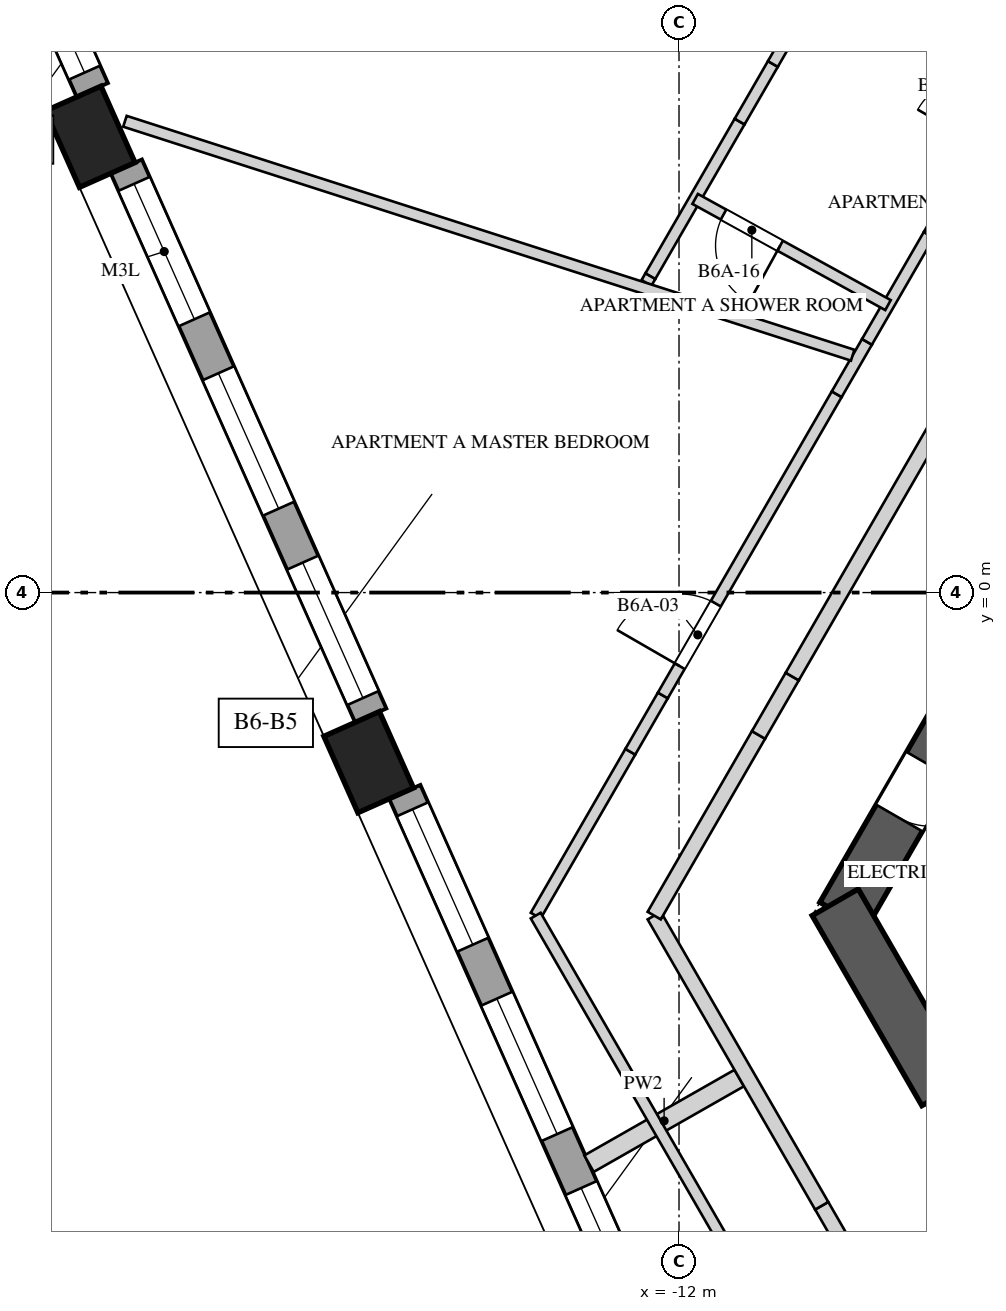
"""IFC4 building model, lengths in metres.
Left out: names, types, materials, properties, quantities, classifications, styles, units other than length and angle.
Written with IfcOpenShell. Run it as: python <this file> out.ifc"""

import sys

from ifc_helpers import new_model, si_unit, direction, frame, frame_2d, origin, origin_2d, place, context, subcontext, project, spatial, rectangle, extrude, element, fill, save


model = new_model("IFC4")
c1 = context("Model", 3, precision=1e-05, world=origin(), true_north=direction((0.0, 1.0)))
c2 = subcontext(c1, "Body", "Model", "MODEL_VIEW")
j1 = project(units=[si_unit("LENGTHUNIT", "METRE"), si_unit("PLANEANGLEUNIT", "RADIAN")], contexts=[c1])
p1 = place(None, origin())
s1 = spatial("IfcSite", under=j1, at=p1, CompositionType="ELEMENT")
p2 = place(p1, origin())
s2 = spatial("IfcBuilding", under=s1, at=p2, CompositionType="ELEMENT")
p3 = place(p2, frame((0.0, 0.0, 245.2)))
s3 = spatial("IfcBuildingStorey", under=s2, at=p3, CompositionType="ELEMENT", Elevation=245.2)
p4 = place(p3, frame((-1.241, 10.65, 0.0), z_axis=(0.0, 0.0, 1.0), x_axis=(-0.500003331888, -0.866023480109, 0.0)))
e1 = element("IfcWall", 1, at=p4, inside=s3, PredefinedType="SHEAR", context=c2, shape_type="SweptSolid", body=[
    extrude(rectangle(XDim=17.205, YDim=0.7, at=frame_2d((8.603, 0.0))), origin(), (0.0, 0.0, 1.0), 4.0),
])
p5 = place(p4, frame((6.808, 0.0, 0.0)))
e2 = element("IfcOpeningElement", 2, at=p5, cuts=e1, PredefinedType="OPENING", context=c2, shape_type="SweptSolid", body=[
    extrude(rectangle(XDim=1.0, YDim=2.4, at=frame_2d((0.5, 1.2))), frame((0.0, 0.36, 0.0), z_axis=(0.0, -1.0, 0.0), x_axis=(1.0, 0.0, 0.0)), (0.0, 0.0, 1.0), 0.72),
])
p6 = place(p4, frame((14.922, 0.0, 0.0)))
e3 = element("IfcOpeningElement", 3, at=p6, cuts=e1, PredefinedType="OPENING", context=c2, shape_type="SweptSolid", body=[
    extrude(rectangle(XDim=0.8, YDim=2.1, at=frame_2d((0.4, 1.05))), frame((0.0, 0.36, 0.0), z_axis=(0.0, -1.0, 0.0), x_axis=(1.0, 0.0, 0.0)), (0.0, 0.0, 1.0), 0.72),
])
p7 = place(p3, frame((-9.945, -4.075, 0.0), z_axis=(0.0, 0.0, 1.0), x_axis=(0.499995765644, -0.866027848477, 0.0)))
e4 = element("IfcWall", 4, at=p7, inside=s3, PredefinedType="SHEAR", context=c2, shape_type="SweptSolid", body=[
    extrude(rectangle(XDim=2.887, YDim=0.7, at=frame_2d((1.443, 0.0))), origin(), (0.0, 0.0, 1.0), 4.0),
])
for number, where, z_axis, x_axis in (
    (5, (-19.746, 5.997, 0.0), (0.0, 0.0, 1.0), (0.407, -0.914, 0.0)),
    (6, (-16.083, -2.231, 0.0), (0.0, 0.0, 1.0), (0.407, -0.914, 0.0)),
):
    element("IfcColumn", number, at=place(p3, frame(where, z_axis=z_axis, x_axis=x_axis)), inside=s3, PredefinedType="COLUMN", context=c2, shape_type="SweptSolid", body=[
        extrude(rectangle(XDim=1.1, YDim=0.8, at=origin_2d()), origin(), (0.0, 0.0, 1.0), 4.0),
    ])
p8 = place(p3, frame((-20.716, 8.851, 0.0), z_axis=(0.0, 0.0, 1.0), x_axis=(0.406821962592, -0.913507466172, 0.0)))
e7 = element("IfcWall", 7, at=p8, inside=s3, PredefinedType="SOLIDWALL", context=c2, shape_type="SweptSolid", body=[
    extrude(rectangle(XDim=2.452, YDim=0.45, at=frame_2d((1.226, 0.0))), origin(), (0.0, 0.0, 1.0), 3.3),
])
p9 = place(p8, frame((0.251, 0.0, 0.4)))
e8 = element("IfcOpeningElement", 8, at=p9, cuts=e7, PredefinedType="OPENING", context=c2, shape_type="SweptSolid", body=[
    extrude(rectangle(XDim=1.95, YDim=2.75, at=frame_2d((0.975, 1.375))), frame((0.0, 0.235, 0.0), z_axis=(0.0, -1.0, 0.0), x_axis=(1.0, 0.0, 0.0)), (0.0, 0.0, 1.0), 0.47),
])
p10 = place(p3, frame((-19.271, 5.606, 0.0), z_axis=(0.0, 0.0, 1.0), x_axis=(0.406760076741, -0.913535023942, 0.0)))
e9 = element("IfcWall", 9, at=p10, inside=s3, PredefinedType="SOLIDWALL", context=c2, shape_type="SweptSolid", body=[
    extrude(rectangle(XDim=7.906, YDim=0.45, at=frame_2d((3.953, 0.0))), origin(), (0.0, 0.0, 1.0), 3.3),
])
p11 = place(p10, frame((0.251, 0.0, 0.4)))
e10 = element("IfcOpeningElement", 10, at=p11, cuts=e9, PredefinedType="OPENING", context=c2, shape_type="SweptSolid", body=[
    extrude(rectangle(XDim=1.95, YDim=2.1, at=frame_2d((0.975, 1.05))), frame((0.0, 0.235, 0.0), z_axis=(0.0, -1.0, 0.0), x_axis=(1.0, 0.0, 0.0)), (0.0, 0.0, 1.0), 0.47),
])
p12 = place(p10, frame((2.978, 0.0, 0.4)))
e11 = element("IfcOpeningElement", 11, at=p12, cuts=e9, PredefinedType="OPENING", context=c2, shape_type="SweptSolid", body=[
    extrude(rectangle(XDim=1.95, YDim=2.75, at=frame_2d((0.975, 1.375))), frame((0.0, 0.235, 0.0), z_axis=(0.0, -1.0, 0.0), x_axis=(1.0, 0.0, 0.0)), (0.0, 0.0, 1.0), 0.47),
])
p13 = place(p10, frame((5.706, 0.0, 0.4)))
e12 = element("IfcOpeningElement", 12, at=p13, cuts=e9, PredefinedType="OPENING", context=c2, shape_type="SweptSolid", body=[
    extrude(rectangle(XDim=1.95, YDim=2.75, at=frame_2d((0.975, 1.375))), frame((0.0, 0.235, 0.0), z_axis=(0.0, -1.0, 0.0), x_axis=(1.0, 0.0, 0.0)), (0.0, 0.0, 1.0), 0.47),
])
p14 = place(p3, frame((-15.608, -2.622, 0.0), z_axis=(0.0, 0.0, 1.0), x_axis=(0.406748602972, -0.91354013266, 0.0)))
e13 = element("IfcWall", 13, at=p14, inside=s3, PredefinedType="SOLIDWALL", context=c2, shape_type="SweptSolid", body=[
    extrude(rectangle(XDim=7.907, YDim=0.45, at=frame_2d((3.953, 0.0))), origin(), (0.0, 0.0, 1.0), 3.3),
])
p15 = place(p14, frame((0.251, 0.0, 0.4)))
e14 = element("IfcOpeningElement", 14, at=p15, cuts=e13, PredefinedType="OPENING", context=c2, shape_type="SweptSolid", body=[
    extrude(rectangle(XDim=1.95, YDim=2.75, at=frame_2d((0.975, 1.375))), frame((0.0, 0.235, 0.0), z_axis=(0.0, -1.0, 0.0), x_axis=(1.0, 0.0, 0.0)), (0.0, 0.0, 1.0), 0.47),
])
p16 = place(p14, frame((2.978, 0.0, 0.4)))
e15 = element("IfcOpeningElement", 15, at=p16, cuts=e13, PredefinedType="OPENING", context=c2, shape_type="SweptSolid", body=[
    extrude(rectangle(XDim=1.95, YDim=2.75, at=frame_2d((0.975, 1.375))), frame((0.0, 0.235, 0.0), z_axis=(0.0, -1.0, 0.0), x_axis=(1.0, 0.0, 0.0)), (0.0, 0.0, 1.0), 0.47),
])
p17 = place(p14, frame((5.706, 0.0, 0.4)))
e16 = element("IfcOpeningElement", 16, at=p17, cuts=e13, PredefinedType="OPENING", context=c2, shape_type="SweptSolid", body=[
    extrude(rectangle(XDim=1.95, YDim=2.75, at=frame_2d((0.975, 1.375))), frame((0.0, 0.235, 0.0), z_axis=(0.0, -1.0, 0.0), x_axis=(1.0, 0.0, 0.0)), (0.0, 0.0, 1.0), 0.47),
])
p18 = place(p3, frame((-13.885, -4.25, 0.0), z_axis=(0.0, 0.0, 1.0), x_axis=(0.499999788377, 0.866025525965, 0.0)))
e17 = element("IfcWall", 17, at=p18, inside=s3, PredefinedType="PARTITIONING", context=c2, shape_type="SweptSolid", body=[
    extrude(rectangle(XDim=2.489, YDim=0.15, at=frame_2d((1.245, 0.0))), origin(), (0.0, 0.0, 1.0), 3.65),
])
p19 = place(p3, frame((-12.641, -2.094, 0.0), z_axis=(0.0, 0.0, 1.0), x_axis=(0.500068347527, 0.865985939725, 0.0)))
e18 = element("IfcWall", 18, at=p19, inside=s3, PredefinedType="PARTITIONING", context=c2, shape_type="SweptSolid", body=[
    extrude(rectangle(XDim=0.855, YDim=0.15, at=frame_2d((0.428, 0.0))), origin(), (0.0, 0.0, 1.0), 2.95),
])
p20 = place(p3, frame((-12.213, -1.354, 0.0), z_axis=(0.0, 0.0, 1.0), x_axis=(0.500001111708, 0.866024761939, 0.0)))
e19 = element("IfcWall", 19, at=p20, inside=s3, PredefinedType="PARTITIONING", context=c2, shape_type="SweptSolid", body=[
    extrude(rectangle(XDim=4.576, YDim=0.15, at=frame_2d((2.288, 0.0))), origin(), (0.0, 0.0, 1.0), 3.65),
])
p21 = place(p20, frame((0.445, 0.0, 0.0)))
e20 = element("IfcOpeningElement", 20, at=p21, cuts=e19, PredefinedType="OPENING", context=c2, shape_type="SweptSolid", body=[
    extrude(rectangle(XDim=0.95, YDim=2.4, at=frame_2d((0.475, 1.2))), frame((0.0, 0.085, 0.0), z_axis=(0.0, -1.0, 0.0), x_axis=(1.0, 0.0, 0.0)), (0.0, 0.0, 1.0), 0.17),
])
p22 = place(p3, frame((-9.925, 2.609, 0.0), z_axis=(0.0, 0.0, 1.0), x_axis=(0.499802134818, 0.866139611167, 0.0)))
e21 = element("IfcWall", 21, at=p22, inside=s3, PredefinedType="PARTITIONING", context=c2, shape_type="SweptSolid", body=[
    extrude(rectangle(XDim=0.796, YDim=0.15, at=frame_2d((0.398, 0.0))), origin(), (0.0, 0.0, 1.0), 2.75),
])
p23 = place(p3, frame((-9.527, 3.298, 0.0), z_axis=(0.0, 0.0, 1.0), x_axis=(0.500094991843, 0.865970553272, 0.0)))
e22 = element("IfcWall", 22, at=p23, inside=s3, PredefinedType="PARTITIONING", context=c2, shape_type="SweptSolid", body=[
    extrude(rectangle(XDim=1.626, YDim=0.15, at=frame_2d((0.813, 0.0))), origin(), (0.0, 0.0, 1.0), 3.65),
])
p24 = place(p3, frame((-8.714, 4.707, 0.0), z_axis=(0.0, 0.0, 1.0), x_axis=(0.499859285417, 0.866106630146, 0.0)))
e23 = element("IfcWall", 23, at=p24, inside=s3, PredefinedType="PARTITIONING", context=c2, shape_type="SweptSolid", body=[
    extrude(rectangle(XDim=0.875, YDim=0.15, at=frame_2d((0.438, 0.0))), origin(), (0.0, 0.0, 1.0), 2.55),
])
p25 = place(p3, frame((-12.428, 4.074, 0.0), z_axis=(0.0, 0.0, 1.0), x_axis=(0.500943559977, 0.865479953388, 0.0)))
e24 = element("IfcWall", 24, at=p25, inside=s3, PredefinedType="PARTITIONING", context=c2, shape_type="SweptSolid", body=[
    extrude(rectangle(XDim=0.104, YDim=0.15, at=frame_2d((0.052, 0.0))), origin(), (0.0, 0.0, 1.0), 2.75),
])
p26 = place(p3, frame((-12.376, 4.164, 0.0), z_axis=(0.0, 0.0, 1.0), x_axis=(0.499998569178, 0.866026229868, 0.0)))
e25 = element("IfcWall", 25, at=p26, inside=s3, PredefinedType="PARTITIONING", context=c2, shape_type="SweptSolid", body=[
    extrude(rectangle(XDim=2.347, YDim=0.15, at=frame_2d((1.174, 0.0))), origin(), (0.0, 0.0, 1.0), 3.65),
])
p27 = place(p3, frame((-11.203, 6.196, 0.0), z_axis=(0.0, 0.0, 1.0), x_axis=(0.499980071345, 0.866036909293, 0.0)))
e26 = element("IfcWall", 26, at=p27, inside=s3, PredefinedType="PARTITIONING", context=c2, shape_type="SweptSolid", body=[
    extrude(rectangle(XDim=0.875, YDim=0.15, at=frame_2d((0.438, 0.0))), origin(), (0.0, 0.0, 1.0), 2.55),
])
p28 = place(p3, frame((-10.765, 6.954, 0.0), z_axis=(0.0, 0.0, 1.0), x_axis=(0.499841962787, 0.866116627388, 0.0)))
e27 = element("IfcWall", 27, at=p28, inside=s3, PredefinedType="PARTITIONING", context=c2, shape_type="SweptSolid", body=[
    extrude(rectangle(XDim=0.943, YDim=0.15, at=frame_2d((0.472, 0.0))), origin(), (0.0, 0.0, 1.0), 3.65),
])
p29 = place(p3, frame((-11.208, -6.387, 0.0), z_axis=(0.0, 0.0, 1.0), x_axis=(-0.868850228445, -0.495075025153, 0.0)))
e28 = element("IfcWall", 28, at=p29, inside=s3, PredefinedType="SOLIDWALL", context=c2, shape_type="SweptSolid", body=[
    extrude(rectangle(XDim=2.274, YDim=0.25, at=frame_2d((1.137, 0.0))), origin(), (0.0, 0.0, 1.0), 3.65),
])
p30 = place(p3, frame((-11.165, -8.961, 0.0), z_axis=(0.0, 0.0, 1.0), x_axis=(-0.500009912158, 0.866019680922, 0.0)))
e29 = element("IfcWall", 29, at=p30, inside=s3, PredefinedType="PARTITIONING", context=c2, shape_type="SweptSolid", body=[
    extrude(rectangle(XDim=5.44, YDim=0.15, at=frame_2d((2.72, 0.0))), origin(), (0.0, 0.0, 1.0), 3.65),
])
p31 = place(p3, frame((-9.715, 3.123, 0.0), z_axis=(0.0, 0.0, 1.0), x_axis=(-0.952031844805, 0.305998964831, 0.0)))
e30 = element("IfcWall", 30, at=p31, inside=s3, PredefinedType="PARTITIONING", context=c2, shape_type="SweptSolid", body=[
    extrude(rectangle(XDim=10.057, YDim=0.15, at=frame_2d((5.028, 0.0))), origin(), (0.0, 0.0, 1.0), 2.75),
])
p32 = place(p3, frame((-9.25, 3.782, 0.0), z_axis=(0.0, 0.0, 1.0), x_axis=(-0.876043224435, 0.482232587991, 0.0)))
e31 = element("IfcWall", 31, at=p32, inside=s3, PredefinedType="PARTITIONING", context=c2, shape_type="SweptSolid", body=[
    extrude(rectangle(XDim=2.896, YDim=0.15, at=frame_2d((1.448, 0.0))), origin(), (0.0, 0.0, 1.0), 3.65),
])
p33 = place(p32, frame((1.62, 0.0, 0.0)))
e32 = element("IfcOpeningElement", 32, at=p33, cuts=e31, PredefinedType="OPENING", context=c2, shape_type="SweptSolid", body=[
    extrude(rectangle(XDim=0.85, YDim=2.4, at=frame_2d((0.425, 1.2))), frame((0.0, 0.085, 0.0), z_axis=(0.0, -1.0, 0.0), x_axis=(1.0, 0.0, 0.0)), (0.0, 0.0, 1.0), 0.17),
])
p34 = place(p3, frame((-9.844, -8.55, 0.0), z_axis=(0.0, 0.0, 1.0), x_axis=(-0.500000383388, 0.866025182435, 0.0)))
e33 = element("IfcWall", 33, at=p34, inside=s3, PredefinedType="SOLIDWALL", context=c2, shape_type="SweptSolid", body=[
    extrude(rectangle(XDim=0.558, YDim=0.2, at=frame_2d((0.279, 0.0))), origin(), (0.0, 0.0, 1.0), 2.95),
])
p35 = place(p3, frame((-10.123, -8.067, 0.0), z_axis=(0.0, 0.0, 1.0), x_axis=(-0.500005339912, 0.866022320763, 0.0)))
e34 = element("IfcWall", 34, at=p35, inside=s3, PredefinedType="SOLIDWALL", context=c2, shape_type="SweptSolid", body=[
    extrude(rectangle(XDim=4.408, YDim=0.2, at=frame_2d((2.204, 0.0))), origin(), (0.0, 0.0, 1.0), 3.65),
])
p36 = place(p3, frame((-12.326, -4.25, 0.0), z_axis=(0.0, 0.0, 1.0), x_axis=(0.499994514761, 0.866028570666, 0.0)))
e35 = element("IfcWall", 35, at=p36, inside=s3, PredefinedType="SOLIDWALL", context=c2, shape_type="SweptSolid", body=[
    extrude(rectangle(XDim=2.745, YDim=0.2, at=frame_2d((1.372, 0.0))), origin(), (0.0, 0.0, 1.0), 3.65),
])
p37 = place(p3, frame((-10.954, -1.873, 0.0), z_axis=(0.0, 0.0, 1.0), x_axis=(0.500016243463, 0.866016025414, 0.0)))
e36 = element("IfcWall", 36, at=p37, inside=s3, PredefinedType="SOLIDWALL", context=c2, shape_type="SweptSolid", body=[
    extrude(rectangle(XDim=0.887, YDim=0.2, at=frame_2d((0.444, 0.0))), origin(), (0.0, 0.0, 1.0), 2.95),
])
p38 = place(p3, frame((-10.51, -1.105, 0.0), z_axis=(0.0, 0.0, 1.0), x_axis=(0.499997905474, 0.866026613056, 0.0)))
e37 = element("IfcWall", 37, at=p38, inside=s3, PredefinedType="SOLIDWALL", context=c2, shape_type="SweptSolid", body=[
    extrude(rectangle(XDim=3.811, YDim=0.2, at=frame_2d((1.905, 0.0))), origin(), (0.0, 0.0, 1.0), 3.65),
])
p39 = place(p9, origin())
e38 = element("IfcWindow", 38, at=p39, inside=s3, PartitioningType="SINGLE_PANEL", PredefinedType="WINDOW", context=c2, shape_type="SweptSolid", body=[
    extrude(rectangle(XDim=1.95, YDim=2.75, at=frame_2d((0.975, 1.375))), frame((0.0, 0.03, 0.0), z_axis=(0.0, -1.0, 0.0), x_axis=(1.0, 0.0, 0.0)), (0.0, 0.0, 1.0), 0.06),
])
fill(e8, e38)
p40 = place(p11, origin())
e39 = element("IfcWindow", 39, at=p40, inside=s3, PartitioningType="SINGLE_PANEL", PredefinedType="WINDOW", context=c2, shape_type="SweptSolid", body=[
    extrude(rectangle(XDim=1.95, YDim=2.1, at=frame_2d((0.975, 1.05))), frame((0.0, 0.03, 0.0), z_axis=(0.0, -1.0, 0.0), x_axis=(1.0, 0.0, 0.0)), (0.0, 0.0, 1.0), 0.06),
])
fill(e10, e39)
p41 = place(p12, origin())
e40 = element("IfcWindow", 40, at=p41, inside=s3, PartitioningType="SINGLE_PANEL", PredefinedType="WINDOW", context=c2, shape_type="SweptSolid", body=[
    extrude(rectangle(XDim=1.95, YDim=2.75, at=frame_2d((0.975, 1.375))), frame((0.0, 0.03, 0.0), z_axis=(0.0, -1.0, 0.0), x_axis=(1.0, 0.0, 0.0)), (0.0, 0.0, 1.0), 0.06),
])
fill(e11, e40)
p42 = place(p13, origin())
e41 = element("IfcWindow", 41, at=p42, inside=s3, PartitioningType="SINGLE_PANEL", PredefinedType="WINDOW", context=c2, shape_type="SweptSolid", body=[
    extrude(rectangle(XDim=1.95, YDim=2.75, at=frame_2d((0.975, 1.375))), frame((0.0, 0.03, 0.0), z_axis=(0.0, -1.0, 0.0), x_axis=(1.0, 0.0, 0.0)), (0.0, 0.0, 1.0), 0.06),
])
fill(e12, e41)
p43 = place(p15, origin())
e42 = element("IfcWindow", 42, at=p43, inside=s3, PartitioningType="SINGLE_PANEL", PredefinedType="WINDOW", context=c2, shape_type="SweptSolid", body=[
    extrude(rectangle(XDim=1.95, YDim=2.75, at=frame_2d((0.975, 1.375))), frame((0.0, 0.03, 0.0), z_axis=(0.0, -1.0, 0.0), x_axis=(1.0, 0.0, 0.0)), (0.0, 0.0, 1.0), 0.06),
])
fill(e14, e42)
p44 = place(p16, origin())
e43 = element("IfcWindow", 43, at=p44, inside=s3, PartitioningType="SINGLE_PANEL", PredefinedType="WINDOW", context=c2, shape_type="SweptSolid", body=[
    extrude(rectangle(XDim=1.95, YDim=2.75, at=frame_2d((0.975, 1.375))), frame((0.0, 0.03, 0.0), z_axis=(0.0, -1.0, 0.0), x_axis=(1.0, 0.0, 0.0)), (0.0, 0.0, 1.0), 0.06),
])
fill(e15, e43)
p45 = place(p17, origin())
e44 = element("IfcWindow", 44, at=p45, inside=s3, PartitioningType="SINGLE_PANEL", PredefinedType="WINDOW", context=c2, shape_type="SweptSolid", body=[
    extrude(rectangle(XDim=1.95, YDim=2.75, at=frame_2d((0.975, 1.375))), frame((0.0, 0.03, 0.0), z_axis=(0.0, -1.0, 0.0), x_axis=(1.0, 0.0, 0.0)), (0.0, 0.0, 1.0), 0.06),
])
fill(e16, e44)
p46 = place(p6, origin())
e45 = element("IfcDoor", 45, at=p46, inside=s3, OperationType="SINGLE_SWING_RIGHT", PredefinedType="DOOR", context=c2, shape_type="SweptSolid", body=[
    extrude(rectangle(XDim=0.8, YDim=2.1, at=frame_2d((0.4, 1.05))), frame((0.0, 0.025, 0.0), z_axis=(0.0, -1.0, 0.0), x_axis=(1.0, 0.0, 0.0)), (0.0, 0.0, 1.0), 0.05),
])
fill(e3, e45)
p47 = place(p21, origin())
e46 = element("IfcDoor", 46, at=p47, inside=s3, OperationType="SINGLE_SWING_LEFT", PredefinedType="DOOR", context=c2, shape_type="SweptSolid", body=[
    extrude(rectangle(XDim=0.95, YDim=2.4, at=frame_2d((0.475, 1.2))), frame((0.0, 0.025, 0.0), z_axis=(0.0, -1.0, 0.0), x_axis=(1.0, 0.0, 0.0)), (0.0, 0.0, 1.0), 0.05),
])
fill(e20, e46)
p48 = place(p33, origin())
e47 = element("IfcDoor", 47, at=p48, inside=s3, OperationType="SINGLE_SWING_RIGHT", PredefinedType="DOOR", context=c2, shape_type="SweptSolid", body=[
    extrude(rectangle(XDim=0.85, YDim=2.4, at=frame_2d((0.425, 1.2))), frame((0.0, 0.025, 0.0), z_axis=(0.0, -1.0, 0.0), x_axis=(1.0, 0.0, 0.0)), (0.0, 0.0, 1.0), 0.05),
])
fill(e32, e47)
save(model, sys.argv[1])
